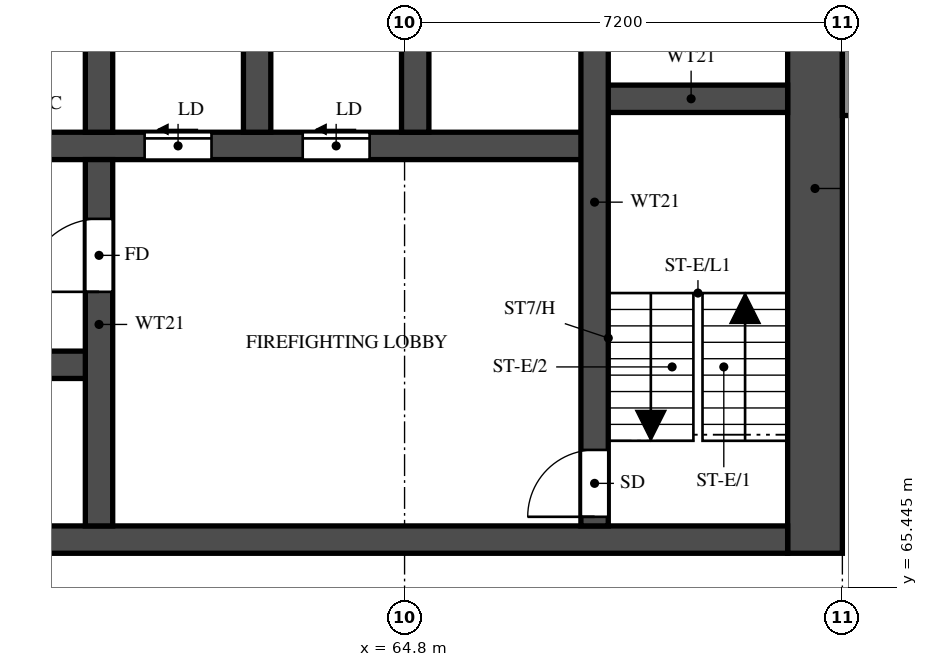
"""IFC4 building model, lengths in metres.
Left out: names, types, materials, properties, quantities, classifications, styles, units other than length and angle.
Written with IfcOpenShell. Run it as: python <this file> out.ifc"""

import sys

from ifc_helpers import new_model, si_unit, direction, frame, frame_2d, origin, place, context, subcontext, project, spatial, rectangle, extrude, element, fill, save


model = new_model("IFC4")
c1 = context("Model", 3, precision=1e-05, world=origin(), true_north=direction((0.0, 1.0)))
c2 = subcontext(c1, "Body", "Model", "MODEL_VIEW")
j1 = project(units=[si_unit("LENGTHUNIT", "METRE"), si_unit("PLANEANGLEUNIT", "RADIAN")], contexts=[c1])
p1 = place(None, origin())
s1 = spatial("IfcSite", under=j1, at=p1, CompositionType="ELEMENT")
p2 = place(p1, origin())
s2 = spatial("IfcBuilding", under=s1, at=p2, CompositionType="ELEMENT")
p3 = place(p2, frame((0.0, 0.0, 65.5)))
s3 = spatial("IfcBuildingStorey", under=s2, at=p3, CompositionType="ELEMENT", Elevation=65.5)
p4 = place(p3, frame((71.55, 66.0, 0.0), z_axis=(0.0, 0.0, 1.0), x_axis=(0.0, 1.0, 0.0)))
e1 = element("IfcWall", 1, at=p4, inside=s3, PredefinedType="SHEAR", context=c2, shape_type="SweptSolid", body=[
    extrude(rectangle(XDim=12.0, YDim=0.9, at=frame_2d((6.0, 0.0))), origin(), (0.0, 0.0, 1.0), 3.18),
])
p5 = place(p3, frame((29.7, 66.225, 0.0), z_axis=(0.0, 0.0, 1.0), x_axis=(1.0, 0.0, 0.0)))
e2 = element("IfcWall", 2, at=p5, inside=s3, PredefinedType="SHEAR", context=c2, shape_type="SweptSolid", body=[
    extrude(rectangle(XDim=41.4, YDim=0.45, at=frame_2d((20.7, 0.0))), origin(), (0.0, 0.0, 1.0), 3.18),
])
p6 = place(p5, frame((0.925, 0.0, 0.0)))
e3 = element("IfcOpeningElement", 3, at=p6, cuts=e2, PredefinedType="OPENING", context=c2, shape_type="SweptSolid", body=[
    extrude(rectangle(XDim=1.1, YDim=2.1, at=frame_2d((0.55, 1.05))), frame((0.0, 0.235, 0.0), z_axis=(0.0, -1.0, 0.0), x_axis=(1.0, 0.0, 0.0)), (0.0, 0.0, 1.0), 0.47),
])
p7 = place(p5, frame((3.738, 0.0, 0.0)))
e4 = element("IfcOpeningElement", 4, at=p7, cuts=e2, PredefinedType="OPENING", context=c2, shape_type="SweptSolid", body=[
    extrude(rectangle(XDim=1.8, YDim=2.1, at=frame_2d((0.9, 1.05))), frame((0.0, 0.235, 0.0), z_axis=(0.0, -1.0, 0.0), x_axis=(1.0, 0.0, 0.0)), (0.0, 0.0, 1.0), 0.47),
])
p8 = place(p3, frame((35.575, 69.1, 0.0), z_axis=(0.0, 0.0, 1.0), x_axis=(1.0, 0.0, 0.0)))
e5 = element("IfcWall", 5, at=p8, inside=s3, PredefinedType="SHEAR", context=c2, shape_type="SweptSolid", body=[
    extrude(rectangle(XDim=24.2, YDim=0.45, at=frame_2d((12.1, 0.0))), origin(), (0.0, 0.0, 1.0), 3.18),
])
p9 = place(p8, frame((1.05, 0.0, 0.0)))
e6 = element("IfcOpeningElement", 6, at=p9, cuts=e5, PredefinedType="OPENING", context=c2, shape_type="SweptSolid", body=[
    extrude(rectangle(XDim=1.1, YDim=2.1, at=frame_2d((0.55, 1.05))), frame((0.0, 0.235, 0.0), z_axis=(0.0, -1.0, 0.0), x_axis=(1.0, 0.0, 0.0)), (0.0, 0.0, 1.0), 0.47),
])
p10 = place(p8, frame((3.8, 0.0, 0.0)))
e7 = element("IfcOpeningElement", 7, at=p10, cuts=e5, PredefinedType="OPENING", context=c2, shape_type="SweptSolid", body=[
    extrude(rectangle(XDim=1.1, YDim=2.1, at=frame_2d((0.55, 1.05))), frame((0.0, 0.235, 0.0), z_axis=(0.0, -1.0, 0.0), x_axis=(1.0, 0.0, 0.0)), (0.0, 0.0, 1.0), 0.47),
])
p11 = place(p8, frame((6.55, 0.0, 0.0)))
e8 = element("IfcOpeningElement", 8, at=p11, cuts=e5, PredefinedType="OPENING", context=c2, shape_type="SweptSolid", body=[
    extrude(rectangle(XDim=1.1, YDim=2.1, at=frame_2d((0.55, 1.05))), frame((0.0, 0.235, 0.0), z_axis=(0.0, -1.0, 0.0), x_axis=(1.0, 0.0, 0.0)), (0.0, 0.0, 1.0), 0.47),
])
p12 = place(p8, frame((9.3, 0.0, 0.0)))
e9 = element("IfcOpeningElement", 9, at=p12, cuts=e5, PredefinedType="OPENING", context=c2, shape_type="SweptSolid", body=[
    extrude(rectangle(XDim=1.1, YDim=2.1, at=frame_2d((0.55, 1.05))), frame((0.0, 0.235, 0.0), z_axis=(0.0, -1.0, 0.0), x_axis=(1.0, 0.0, 0.0)), (0.0, 0.0, 1.0), 0.47),
])
p13 = place(p8, frame((12.05, 0.0, 0.0)))
e10 = element("IfcOpeningElement", 10, at=p13, cuts=e5, PredefinedType="OPENING", context=c2, shape_type="SweptSolid", body=[
    extrude(rectangle(XDim=1.1, YDim=2.1, at=frame_2d((0.55, 1.05))), frame((0.0, 0.235, 0.0), z_axis=(0.0, -1.0, 0.0), x_axis=(1.0, 0.0, 0.0)), (0.0, 0.0, 1.0), 0.47),
])
p14 = place(p8, frame((14.8, 0.0, 0.0)))
e11 = element("IfcOpeningElement", 11, at=p14, cuts=e5, PredefinedType="OPENING", context=c2, shape_type="SweptSolid", body=[
    extrude(rectangle(XDim=1.1, YDim=2.1, at=frame_2d((0.55, 1.05))), frame((0.0, 0.235, 0.0), z_axis=(0.0, -1.0, 0.0), x_axis=(1.0, 0.0, 0.0)), (0.0, 0.0, 1.0), 0.47),
])
p15 = place(p3, frame((32.875, 72.7, 0.0), z_axis=(0.0, 0.0, 1.0), x_axis=(1.0, 0.0, 0.0)))
e12 = element("IfcWall", 12, at=p15, inside=s3, PredefinedType="SHEAR", context=c2, shape_type="SweptSolid", body=[
    extrude(rectangle(XDim=35.05, YDim=0.45, at=frame_2d((17.525, 0.0))), origin(), (0.0, 0.0, 1.0), 3.18),
])
p16 = place(p15, frame((19.8, 0.0, 0.0)))
e13 = element("IfcOpeningElement", 13, at=p16, cuts=e12, PredefinedType="OPENING", context=c2, shape_type="SweptSolid", body=[
    extrude(rectangle(XDim=1.1, YDim=2.1, at=frame_2d((0.55, 1.05))), frame((0.0, 0.235, 0.0), z_axis=(0.0, -1.0, 0.0), x_axis=(1.0, 0.0, 0.0)), (0.0, 0.0, 1.0), 0.47),
])
p17 = place(p15, frame((27.65, 0.0, 0.0)))
e14 = element("IfcOpeningElement", 14, at=p17, cuts=e12, PredefinedType="OPENING", context=c2, shape_type="SweptSolid", body=[
    extrude(rectangle(XDim=1.1, YDim=2.1, at=frame_2d((0.55, 1.05))), frame((0.0, 0.235, 0.0), z_axis=(0.0, -1.0, 0.0), x_axis=(1.0, 0.0, 0.0)), (0.0, 0.0, 1.0), 0.47),
])
p18 = place(p15, frame((30.25, 0.0, 0.0)))
e15 = element("IfcOpeningElement", 15, at=p18, cuts=e12, PredefinedType="OPENING", context=c2, shape_type="SweptSolid", body=[
    extrude(rectangle(XDim=1.1, YDim=2.1, at=frame_2d((0.55, 1.05))), frame((0.0, 0.235, 0.0), z_axis=(0.0, -1.0, 0.0), x_axis=(1.0, 0.0, 0.0)), (0.0, 0.0, 1.0), 0.47),
])
p19 = place(p15, frame((3.75, 0.0, 0.0)))
e16 = element("IfcOpeningElement", 16, at=p19, cuts=e12, PredefinedType="OPENING", context=c2, shape_type="SweptSolid", body=[
    extrude(rectangle(XDim=1.1, YDim=2.1, at=frame_2d((0.55, 1.05))), frame((0.0, 0.235, 0.0), z_axis=(0.0, -1.0, 0.0), x_axis=(1.0, 0.0, 0.0)), (0.0, 0.0, 1.0), 0.47),
])
p20 = place(p15, frame((6.5, 0.0, 0.0)))
e17 = element("IfcOpeningElement", 17, at=p20, cuts=e12, PredefinedType="OPENING", context=c2, shape_type="SweptSolid", body=[
    extrude(rectangle(XDim=1.1, YDim=2.1, at=frame_2d((0.55, 1.05))), frame((0.0, 0.235, 0.0), z_axis=(0.0, -1.0, 0.0), x_axis=(1.0, 0.0, 0.0)), (0.0, 0.0, 1.0), 0.47),
])
p21 = place(p15, frame((9.25, 0.0, 0.0)))
e18 = element("IfcOpeningElement", 18, at=p21, cuts=e12, PredefinedType="OPENING", context=c2, shape_type="SweptSolid", body=[
    extrude(rectangle(XDim=1.1, YDim=2.1, at=frame_2d((0.55, 1.05))), frame((0.0, 0.235, 0.0), z_axis=(0.0, -1.0, 0.0), x_axis=(1.0, 0.0, 0.0)), (0.0, 0.0, 1.0), 0.47),
])
p22 = place(p15, frame((12.0, 0.0, 0.0)))
e19 = element("IfcOpeningElement", 19, at=p22, cuts=e12, PredefinedType="OPENING", context=c2, shape_type="SweptSolid", body=[
    extrude(rectangle(XDim=1.1, YDim=2.1, at=frame_2d((0.55, 1.05))), frame((0.0, 0.235, 0.0), z_axis=(0.0, -1.0, 0.0), x_axis=(1.0, 0.0, 0.0)), (0.0, 0.0, 1.0), 0.47),
])
p23 = place(p15, frame((14.75, 0.0, 0.0)))
e20 = element("IfcOpeningElement", 20, at=p23, cuts=e12, PredefinedType="OPENING", context=c2, shape_type="SweptSolid", body=[
    extrude(rectangle(XDim=1.1, YDim=2.1, at=frame_2d((0.55, 1.05))), frame((0.0, 0.235, 0.0), z_axis=(0.0, -1.0, 0.0), x_axis=(1.0, 0.0, 0.0)), (0.0, 0.0, 1.0), 0.47),
])
p24 = place(p15, frame((17.5, 0.0, 0.0)))
e21 = element("IfcOpeningElement", 21, at=p24, cuts=e12, PredefinedType="OPENING", context=c2, shape_type="SweptSolid", body=[
    extrude(rectangle(XDim=1.1, YDim=2.1, at=frame_2d((0.55, 1.05))), frame((0.0, 0.235, 0.0), z_axis=(0.0, -1.0, 0.0), x_axis=(1.0, 0.0, 0.0)), (0.0, 0.0, 1.0), 0.47),
])
p25 = place(p15, frame((0.913, 0.0, 0.0)))
e22 = element("IfcOpeningElement", 22, at=p25, cuts=e12, PredefinedType="OPENING", context=c2, shape_type="SweptSolid", body=[
    extrude(rectangle(XDim=1.1, YDim=2.1, at=frame_2d((0.55, 1.05))), frame((0.0, 0.235, 0.0), z_axis=(0.0, -1.0, 0.0), x_axis=(1.0, 0.0, 0.0)), (0.0, 0.0, 1.0), 0.47),
])
p26 = place(p3, frame((67.925, 73.475, 0.0), z_axis=(0.0, 0.0, 1.0), x_axis=(1.0, 0.0, 0.0)))
e23 = element("IfcWall", 23, at=p26, inside=s3, PredefinedType="SHEAR", context=c2, shape_type="SweptSolid", body=[
    extrude(rectangle(XDim=3.175, YDim=0.45, at=frame_2d((1.587, 0.0))), origin(), (0.0, 0.0, 1.0), 3.18),
])
p27 = place(p3, frame((67.925, 66.45, 0.0), z_axis=(0.0, 0.0, 1.0), x_axis=(0.0, 1.0, 0.0)))
e24 = element("IfcWall", 24, at=p27, inside=s3, PredefinedType="SHEAR", context=c2, shape_type="SweptSolid", body=[
    extrude(rectangle(XDim=10.65, YDim=0.45, at=frame_2d((5.325, 0.0))), origin(), (0.0, 0.0, 1.0), 3.18),
])
p28 = place(p27, frame((0.15, 0.0, 0.0)))
e25 = element("IfcOpeningElement", 25, at=p28, cuts=e24, PredefinedType="OPENING", context=c2, shape_type="SweptSolid", body=[
    extrude(rectangle(XDim=1.1, YDim=2.1, at=frame_2d((0.55, 1.05))), frame((0.0, 0.235, 0.0), z_axis=(0.0, -1.0, 0.0), x_axis=(1.0, 0.0, 0.0)), (0.0, 0.0, 1.0), 0.47),
])
p29 = place(p3, frame((59.775, 66.45, 0.0), z_axis=(0.0, 0.0, 1.0), x_axis=(0.0, 1.0, 0.0)))
e26 = element("IfcWall", 26, at=p29, inside=s3, PredefinedType="SHEAR", context=c2, shape_type="SweptSolid", body=[
    extrude(rectangle(XDim=6.025, YDim=0.45, at=frame_2d((3.013, 0.0))), origin(), (0.0, 0.0, 1.0), 3.18),
])
p30 = place(p29, frame((3.85, 0.0, 0.0)))
e27 = element("IfcOpeningElement", 27, at=p30, cuts=e26, PredefinedType="OPENING", context=c2, shape_type="SweptSolid", body=[
    extrude(rectangle(XDim=1.2, YDim=2.1, at=frame_2d((0.6, 1.05))), frame((0.0, 0.235, 0.0), z_axis=(0.0, -1.0, 0.0), x_axis=(1.0, 0.0, 0.0)), (0.0, 0.0, 1.0), 0.47),
])
for number, where, z_axis, x_axis in (
    (28, (59.775, 72.925, 0.0), (0.0, 0.0, 1.0), (0.0, 1.0, 0.0)),
    (29, (62.375, 72.925, 0.0), (0.0, 0.0, 1.0), (0.0, 1.0, 0.0)),
    (30, (64.975, 72.925, 0.0), (0.0, 0.0, 1.0), (0.0, 1.0, 0.0)),
):
    element("IfcWall", number, at=place(p3, frame(where, z_axis=z_axis, x_axis=x_axis)), inside=s3, PredefinedType="SHEAR", context=c2, shape_type="SweptSolid", body=[
        extrude(rectangle(XDim=2.95, YDim=0.45, at=frame_2d((1.475, 0.0))), origin(), (0.0, 0.0, 1.0), 3.18),
    ])
p31 = place(p3, frame((72.1, 73.2, 0.0), z_axis=(0.0, 0.0, 1.0), x_axis=(0.0, 1.0, 0.0)))
e31 = element("IfcWall", 31, at=p31, inside=s3, PredefinedType="SOLIDWALL", context=c2, shape_type="SweptSolid", body=[
    extrude(rectangle(XDim=4.8, YDim=0.2, at=frame_2d((2.4, 0.0))), origin(), (0.0, 0.0, 1.0), 3.18),
])
p32 = place(p28, origin())
e32 = element("IfcDoor", 32, at=p32, inside=s3, OperationType="SINGLE_SWING_LEFT", PredefinedType="DOOR", context=c2, shape_type="SweptSolid", body=[
    extrude(rectangle(XDim=1.1, YDim=2.1, at=frame_2d((0.55, 1.05))), frame((0.0, 0.025, 0.0), z_axis=(0.0, -1.0, 0.0), x_axis=(1.0, 0.0, 0.0)), (0.0, 0.0, 1.0), 0.05),
])
fill(e25, e32)
p33 = place(p30, origin())
e33 = element("IfcDoor", 33, at=p33, inside=s3, OperationType="SINGLE_SWING_RIGHT", PredefinedType="DOOR", context=c2, shape_type="SweptSolid", body=[
    extrude(rectangle(XDim=1.2, YDim=2.1, at=frame_2d((0.6, 1.05))), frame((0.0, 0.025, 0.0), z_axis=(0.0, -1.0, 0.0), x_axis=(1.0, 0.0, 0.0)), (0.0, 0.0, 1.0), 0.05),
])
fill(e27, e33)
p34 = place(p17, origin())
e34 = element("IfcDoor", 34, at=p34, inside=s3, OperationType="SLIDING_TO_LEFT", PredefinedType="DOOR", context=c2, shape_type="SweptSolid", body=[
    extrude(rectangle(XDim=1.1, YDim=2.1, at=frame_2d((0.55, 1.05))), frame((0.0, 0.025, 0.0), z_axis=(0.0, -1.0, 0.0), x_axis=(1.0, 0.0, 0.0)), (0.0, 0.0, 1.0), 0.05),
])
fill(e14, e34)
p35 = place(p18, origin())
e35 = element("IfcDoor", 35, at=p35, inside=s3, OperationType="SLIDING_TO_LEFT", PredefinedType="DOOR", context=c2, shape_type="SweptSolid", body=[
    extrude(rectangle(XDim=1.1, YDim=2.1, at=frame_2d((0.55, 1.05))), frame((0.0, 0.025, 0.0), z_axis=(0.0, -1.0, 0.0), x_axis=(1.0, 0.0, 0.0)), (0.0, 0.0, 1.0), 0.05),
])
fill(e15, e35)
save(model, sys.argv[1])
